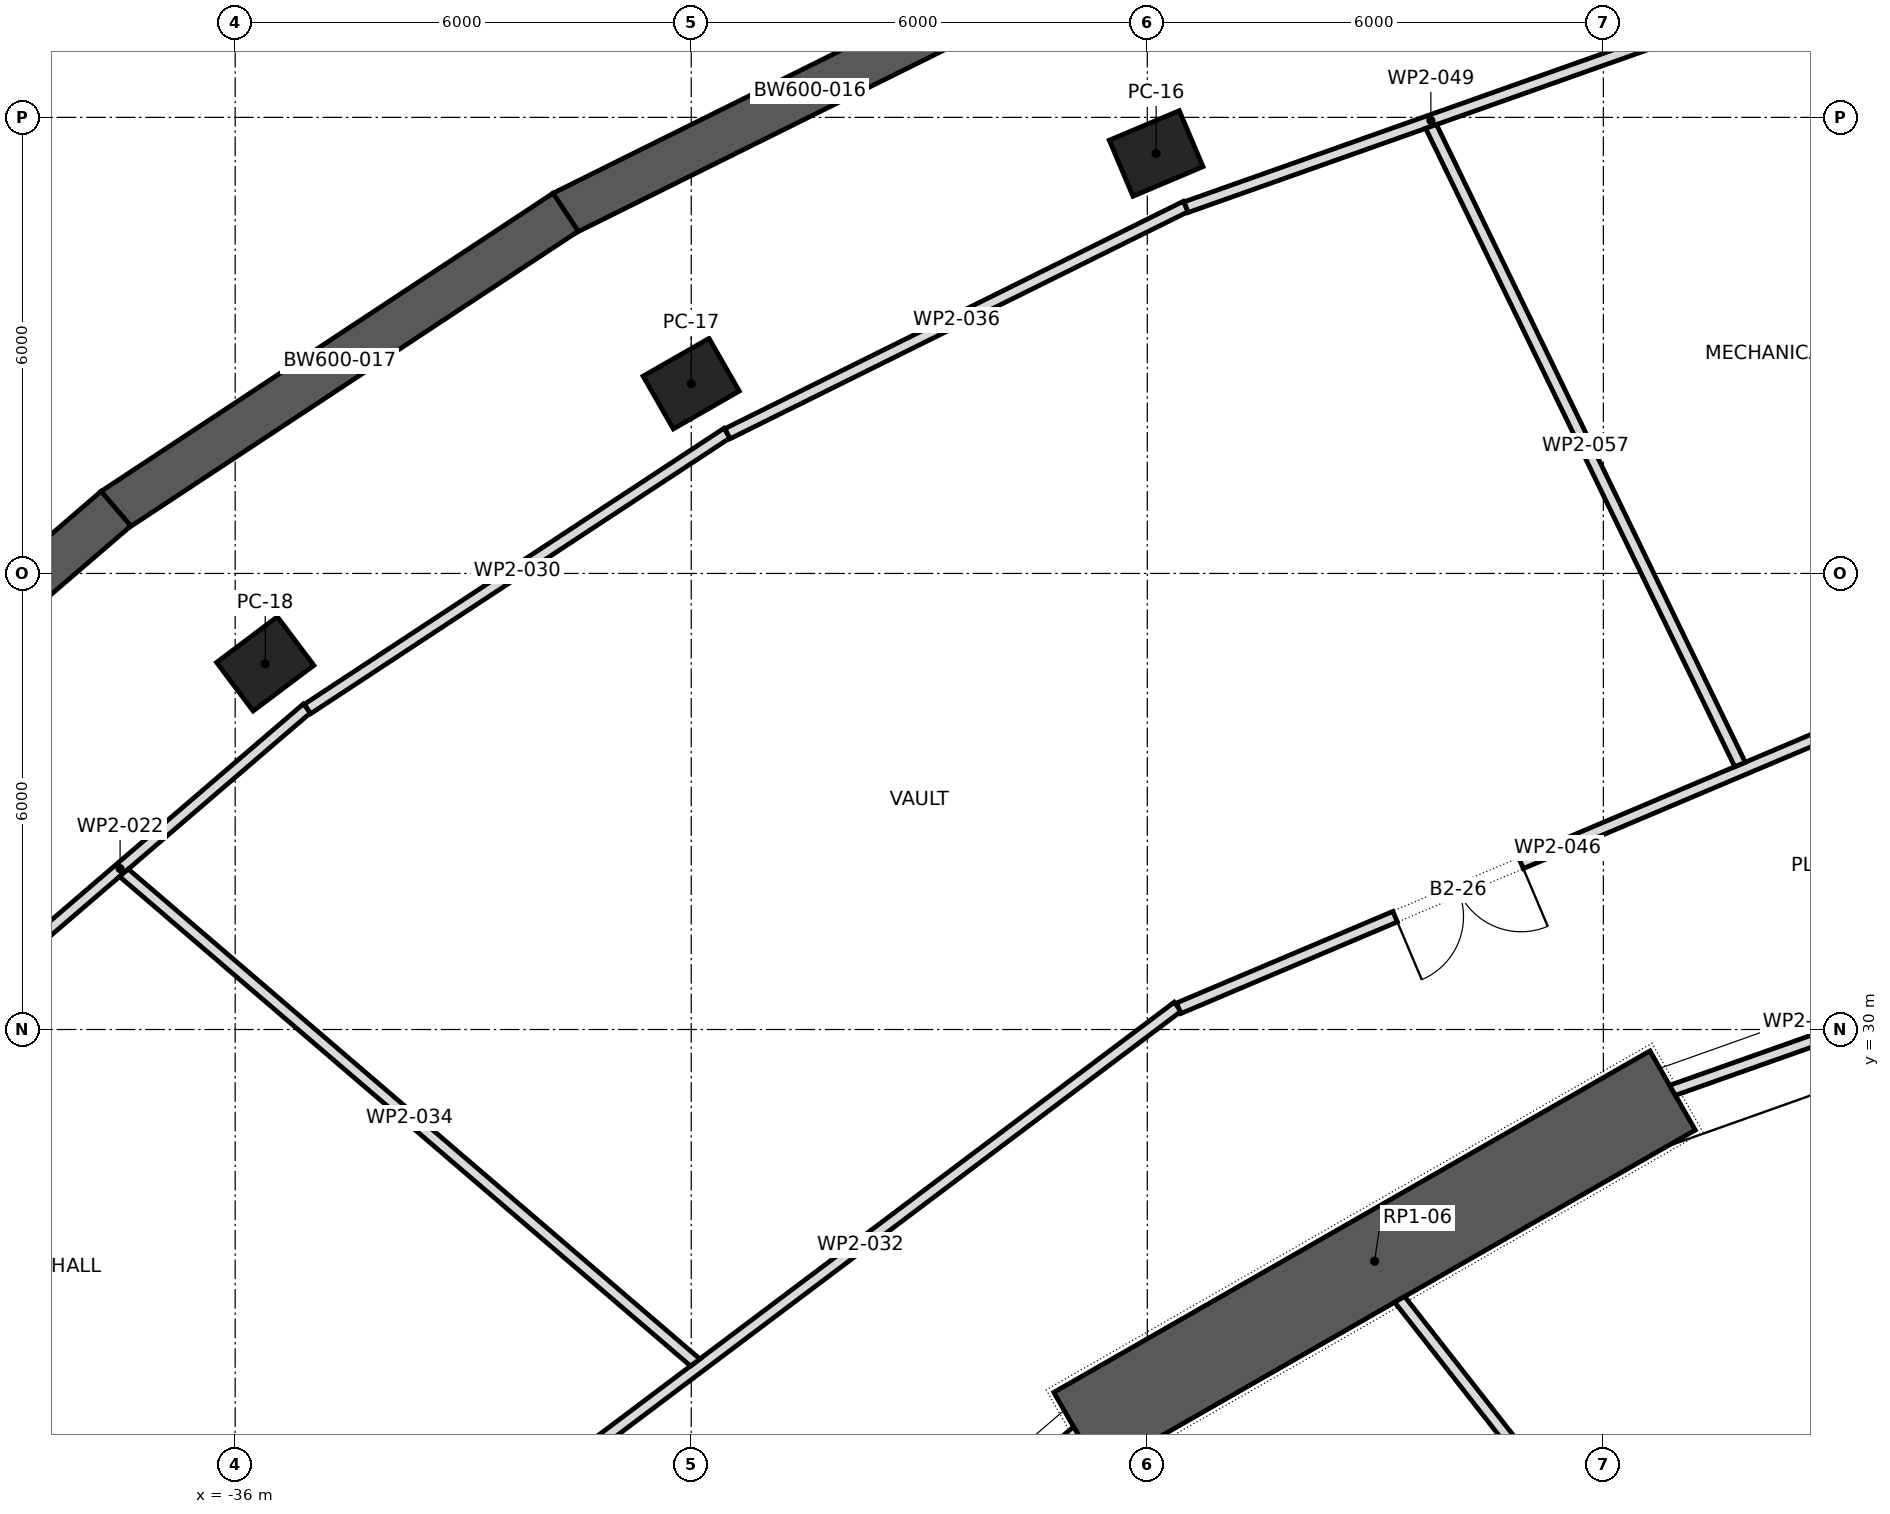
"""IFC4 building model, lengths in metres.
Left out: names, types, materials, properties, quantities, classifications, styles, units other than length and angle.
Written with IfcOpenShell. Run it as: python <this file> out.ifc"""

import sys

from ifc_helpers import new_model, si_unit, direction, frame, frame_2d, origin, origin_2d, place, context, subcontext, project, spatial, polyline, rectangle, outline, extrude, element, fill, save


model = new_model("IFC4")
c1 = context("Model", 3, precision=1e-05, world=origin(), true_north=direction((0.0, 1.0)))
c2 = subcontext(c1, "Body", "Model", "MODEL_VIEW")
j1 = project(units=[si_unit("LENGTHUNIT", "METRE"), si_unit("PLANEANGLEUNIT", "RADIAN")], contexts=[c1])
p1 = place(None, origin())
s1 = spatial("IfcSite", under=j1, at=p1, CompositionType="ELEMENT")
p2 = place(p1, origin())
s2 = spatial("IfcBuilding", under=s1, at=p2, CompositionType="ELEMENT")
p3 = place(p2, frame((0.0, 0.0, -9.5)))
s3 = spatial("IfcBuildingStorey", under=s2, at=p3, CompositionType="ELEMENT", Elevation=-9.5)
for number, where, z_axis, x_axis in (
    (1, (-23.884, 41.525, 0.0), (0.0, 0.0, 1.0), (-0.921, -0.389, 0.0)),
    (2, (-30.001, 38.497, 0.0), (0.0, 0.0, 1.0), (-0.868, -0.497, 0.0)),
    (3, (-35.605, 34.81, 0.0), (0.0, 0.0, 1.0), (-0.799, -0.601, 0.0)),
):
    element("IfcColumn", number, at=place(p3, frame(where, z_axis=z_axis, x_axis=x_axis)), inside=s3, PredefinedType="COLUMN", context=c2, shape_type="SweptSolid", body=[
        extrude(rectangle(XDim=1.0, YDim=0.8, at=origin_2d()), origin(), (0.0, 0.0, 1.0), 5.5),
    ])
p4 = place(p3, frame((-17.089, 29.198, 0.0), z_axis=(0.0, 0.0, 1.0), x_axis=(-0.867760656864, -0.496982336103, 0.0)))
e4 = element("IfcWall", 4, at=p4, inside=s3, PredefinedType="SHEAR", context=c2, shape_type="SweptSolid", body=[
    extrude(rectangle(XDim=9.038, YDim=1.2, at=frame_2d((4.519, 0.0))), origin(), (0.0, 0.0, 1.0), 5.5),
])
p5 = place(p3, frame((-25.195, 43.955, 0.0), z_axis=(0.0, 0.0, 1.0), x_axis=(-0.895750986496, -0.44455614965, 0.0)))
e5 = element("IfcWall", 5, at=p5, inside=s3, PredefinedType="SOLIDWALL", context=c2, shape_type="SweptSolid", body=[
    extrude(rectangle(XDim=7.245, YDim=0.6, at=frame_2d((3.623, 0.0))), origin(), (0.0, 0.0, 1.0), 5.5),
])
p6 = place(p3, frame((-31.652, 40.752, 0.0), z_axis=(0.0, 0.0, 1.0), x_axis=(-0.834745196239, -0.550636411215, 0.0)))
e6 = element("IfcWall", 6, at=p6, inside=s3, PredefinedType="SOLIDWALL", context=c2, shape_type="SweptSolid", body=[
    extrude(rectangle(XDim=7.124, YDim=0.6, at=frame_2d((3.562, 0.0))), origin(), (0.0, 0.0, 1.0), 5.5),
])
p7 = place(p3, frame((-37.568, 36.853, 0.0), z_axis=(0.0, 0.0, 1.0), x_axis=(-0.758319142722, -0.65188348482, 0.0)))
e7 = element("IfcWall", 7, at=p7, inside=s3, PredefinedType="SOLIDWALL", context=c2, shape_type="SweptSolid", body=[
    extrude(rectangle(XDim=6.991, YDim=0.6, at=frame_2d((3.496, 0.0))), origin(), (0.0, 0.0, 1.0), 5.5),
])
p8 = place(p3, frame((-39.973, 30.007, 0.0), z_axis=(0.0, 0.0, 1.0), x_axis=(0.759038455419, 0.651045791934, 0.0)))
e8 = element("IfcWall", 8, at=p8, inside=s3, PredefinedType="PARTITIONING", context=c2, shape_type="SweptSolid", body=[
    extrude(rectangle(XDim=6.479, YDim=0.15, at=frame_2d((3.24, 0.0))), origin(), (0.0, 0.0, 1.0), 5.05),
])
p9 = place(p3, frame((-35.049, 34.217, 0.0), z_axis=(0.0, 0.0, 1.0), x_axis=(0.83553583791, 0.549435950378, 0.0)))
e9 = element("IfcWall", 9, at=p9, inside=s3, PredefinedType="PARTITIONING", context=c2, shape_type="SweptSolid", body=[
    extrude(rectangle(XDim=6.606, YDim=0.15, at=frame_2d((3.303, 0.0))), origin(), (0.0, 0.0, 1.0), 5.05),
])
p10 = place(p3, frame((-31.947, 24.022, 0.0), z_axis=(0.0, 0.0, 1.0), x_axis=(0.799194171191, 0.601072937949, 0.0)))
e10 = element("IfcWall", 10, at=p10, inside=s3, PredefinedType="PARTITIONING", context=c2, shape_type="SweptSolid", body=[
    extrude(rectangle(XDim=10.444, YDim=0.15, at=frame_2d((5.222, 0.0))), origin(), (0.0, 0.0, 1.0), 5.05),
])
p11 = place(p3, frame((-29.947, 25.619, 0.0), z_axis=(0.0, 0.0, 1.0), x_axis=(-0.759265306208, 0.650781218836, 0.0)))
e11 = element("IfcWall", 11, at=p11, inside=s3, PredefinedType="PARTITIONING", context=c2, shape_type="SweptSolid", body=[
    extrude(outline(polyline([(-0.017, -0.075), (9.888, -0.075), (9.911, 0.075), (0.017, 0.075), (-0.017, -0.075)])), origin(), (0.0, 0.0, 1.0), 5.05),
])
p12 = place(p3, frame((-29.523, 37.838, 0.0), z_axis=(0.0, 0.0, 1.0), x_axis=(0.895909442692, 0.444236727991, 0.0)))
e12 = element("IfcWall", 12, at=p12, inside=s3, PredefinedType="PARTITIONING", context=c2, shape_type="SweptSolid", body=[
    extrude(rectangle(XDim=6.731, YDim=0.15, at=frame_2d((3.365, 0.0))), origin(), (0.0, 0.0, 1.0), 5.05),
])
p13 = place(p3, frame((-24.932, 24.708, 0.0), z_axis=(0.0, 0.0, 1.0), x_axis=(-0.760084552743, -0.649824185978, 0.0)))
e13 = element("IfcWall", 13, at=p13, inside=s3, PredefinedType="PARTITIONING", context=c2, shape_type="SweptSolid", body=[
    extrude(outline(polyline([(-0.014, -0.075), (5.09, -0.075), (5.06, 0.075), (0.014, 0.075), (-0.014, -0.075)])), origin(), (0.0, 0.0, 1.0), 4.6),
])
p14 = place(p3, frame((-23.586, 30.28, 0.0), z_axis=(0.0, 0.0, 1.0), x_axis=(0.920903415875, 0.389790839591, 0.0)))
e14 = element("IfcWall", 14, at=p14, inside=s3, PredefinedType="PARTITIONING", context=c2, shape_type="SweptSolid", body=[
    extrude(rectangle(XDim=10.823, YDim=0.15, at=frame_2d((5.412, 0.0))), origin(), (0.0, 0.0, 1.0), 5.05),
])
p15 = place(p14, frame((3.091, 0.0, 0.0)))
e15 = element("IfcOpeningElement", 15, at=p15, cuts=e14, PredefinedType="OPENING", context=c2, shape_type="SweptSolid", body=[
    extrude(rectangle(XDim=1.8, YDim=2.1, at=frame_2d((0.9, 1.05))), frame((0.0, 0.087, 0.0), z_axis=(0.0, -1.0, 0.0), x_axis=(1.0, 0.0, 0.0)), (0.0, 0.0, 1.0), 0.174),
])
p16 = place(p3, frame((-23.49, 40.819, 0.0), z_axis=(0.0, 0.0, 1.0), x_axis=(0.942678523295, 0.333702265079, 0.0)))
e16 = element("IfcWall", 16, at=p16, inside=s3, PredefinedType="PARTITIONING", context=c2, shape_type="SweptSolid", body=[
    extrude(rectangle(XDim=6.832, YDim=0.15, at=frame_2d((3.416, 0.0))), origin(), (0.0, 0.0, 1.0), 5.05),
])
p17 = place(p3, frame((-20.68, 26.45, 0.0), z_axis=(0.0, 0.0, 1.0), x_axis=(0.616465586388, -0.787381851962, 0.0)))
e17 = element("IfcWall", 17, at=p17, inside=s3, PredefinedType="PARTITIONING", context=c2, shape_type="SweptSolid", body=[
    extrude(outline(polyline([(-0.011, -0.075), (14.1, -0.075), (14.1, 0.075), (0.011, 0.075), (-0.011, -0.075)])), origin(), (0.0, 0.0, 1.0), 5.05),
])
p18 = place(p3, frame((-16.202, 33.486, 0.0), z_axis=(0.0, 0.0, 1.0), x_axis=(-0.435764801027, 0.900060574731, 0.0)))
e18 = element("IfcWall", 18, at=p18, inside=s3, PredefinedType="PARTITIONING", context=c2, shape_type="SweptSolid", body=[
    extrude(outline(polyline([(-0.004, -0.075), (9.319, -0.075), (9.335, 0.075), (0.004, 0.075), (-0.004, -0.075)])), origin(), (0.0, 0.0, 1.0), 5.05),
])
p19 = place(p3, frame((-11.967, 31.011, 0.0), z_axis=(0.0, 0.0, 1.0), x_axis=(-0.942814385805, -0.333318217204, 0.0)))
e19 = element("IfcWall", 19, at=p19, inside=s3, PredefinedType="PARTITIONING", context=c2, shape_type="SweptSolid", body=[
    extrude(outline(polyline([(-0.013, -0.075), (5.448, -0.075), (5.421, 0.075), (0.013, 0.075), (-0.013, -0.075)])), origin(), (0.0, 0.0, 1.0), 4.6),
])
p20 = place(p15, frame((1.8, 0.0, 0.0), z_axis=(0.0, 0.0, 1.0), x_axis=(-1.0, 0.0, 0.0)))
e20 = element("IfcDoor", 20, at=p20, inside=s3, OperationType="DOUBLE_DOOR_SINGLE_SWING", PredefinedType="DOOR", context=c2, shape_type="SweptSolid", body=[
    extrude(rectangle(XDim=1.8, YDim=2.1, at=frame_2d((0.9, 1.05))), frame((0.0, 0.025, 0.0), z_axis=(0.0, -1.0, 0.0), x_axis=(1.0, 0.0, 0.0)), (0.0, 0.0, 1.0), 0.05),
])
fill(e15, e20)
save(model, sys.argv[1])
